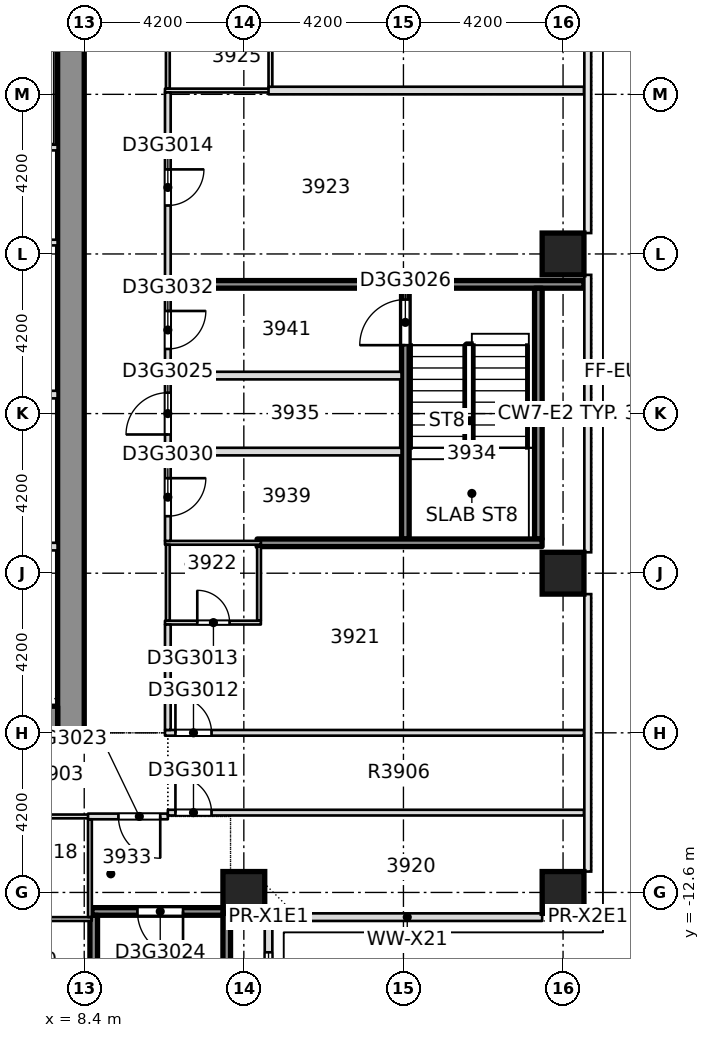
"""IFC4 building model, lengths in metres.
Left out: names, types, materials, properties, quantities, classifications, styles, units other than length and angle.
Written with IfcOpenShell. Run it as: python <this file> out.ifc"""

import sys

from ifc_helpers import new_model, si_unit, direction, frame, frame_2d, origin, origin_2d, place, context, subcontext, project, spatial, rectangle, extrude, element, fill, save


model = new_model("IFC4")
c1 = context("Model", 3, precision=1e-05, world=origin(), true_north=direction((0.0, 1.0)))
c2 = subcontext(c1, "Body", "Model", "MODEL_VIEW")
j1 = project(units=[si_unit("LENGTHUNIT", "METRE"), si_unit("PLANEANGLEUNIT", "RADIAN")], contexts=[c1])
p1 = place(None, origin())
s1 = spatial("IfcSite", under=j1, at=p1, CompositionType="ELEMENT")
p2 = place(p1, origin())
s2 = spatial("IfcBuilding", under=s1, at=p2, CompositionType="ELEMENT")
p3 = place(p2, frame((0.0, 0.0, 153.8)))
s3 = spatial("IfcBuildingStorey", under=s2, at=p3, CompositionType="ELEMENT", Elevation=153.8)
p4 = place(p3, frame((8.05, -8.4, -0.4), z_axis=(0.0, 0.0, 1.0), x_axis=(0.0, 1.0, 0.0)))
e1 = element("IfcWall", 1, at=p4, inside=s3, PredefinedType="SOLIDWALL", context=c2, shape_type="SweptSolid", body=[
    extrude(rectangle(XDim=30.15, YDim=0.7, at=frame_2d((15.075, 0.0))), origin(), (0.0, 0.0, 1.0), 3.45),
])
p5 = place(p4, frame((19.3, 0.0, 0.4)))
e2 = element("IfcOpeningElement", 2, at=p5, cuts=e1, PredefinedType="OPENING", context=c2, shape_type="SweptSolid", body=[
    extrude(rectangle(XDim=1.2, YDim=2.1, at=frame_2d((0.6, 1.05))), frame((0.0, 0.36, 0.0), z_axis=(0.0, -1.0, 0.0), x_axis=(1.0, 0.0, 0.0)), (0.0, 0.0, 1.0), 0.72),
])
p6 = place(p3, frame((-7.7, -8.05, -0.4), z_axis=(0.0, 0.0, 1.0), x_axis=(1.0, 0.0, 0.0)))
e3 = element("IfcWall", 3, at=p6, inside=s3, PredefinedType="SHEAR", context=c2, shape_type="SweptSolid", body=[
    extrude(rectangle(XDim=15.4, YDim=0.7, at=frame_2d((7.7, 0.0))), origin(), (0.0, 0.0, 1.0), 3.45),
])
p7 = place(p6, frame((2.95, 0.0, 0.4)))
e4 = element("IfcOpeningElement", 4, at=p7, cuts=e3, PredefinedType="OPENING", context=c2, shape_type="SweptSolid", body=[
    extrude(rectangle(XDim=1.8, YDim=2.1, at=frame_2d((0.9, 1.05))), frame((0.0, 0.36, 0.0), z_axis=(0.0, -1.0, 0.0), x_axis=(1.0, 0.0, 0.0)), (0.0, 0.0, 1.0), 0.72),
])
p8 = place(p6, frame((10.65, 0.0, 0.4)))
e5 = element("IfcOpeningElement", 5, at=p8, cuts=e3, PredefinedType="OPENING", context=c2, shape_type="SweptSolid", body=[
    extrude(rectangle(XDim=1.8, YDim=2.1, at=frame_2d((0.9, 1.05))), frame((0.0, 0.36, 0.0), z_axis=(0.0, -1.0, 0.0), x_axis=(1.0, 0.0, 0.0)), (0.0, 0.0, 1.0), 0.72),
])
for number, where, z_axis, x_axis in (
    (6, (12.6, -12.6, -0.4), (0.0, 0.0, 1.0), (1.0, 0.0, 0.0)),
    (7, (21.0, -12.6, -0.4), (0.0, 0.0, 1.0), (1.0, 0.0, 0.0)),
    (8, (21.0, -4.2, -0.4), (0.0, 0.0, 1.0), (1.0, 0.0, 0.0)),
    (9, (21.0, 4.2, -0.4), (0.0, 0.0, 1.0), (1.0, 0.0, 0.0)),
):
    element("IfcColumn", number, at=place(p3, frame(where, z_axis=z_axis, x_axis=x_axis)), inside=s3, PredefinedType="COLUMN", context=c2, shape_type="SweptSolid", body=[
        extrude(rectangle(XDim=1.1, YDim=1.1, at=origin_2d()), origin(), (0.0, 0.0, 1.0), 3.45),
    ])
p9 = place(p3, frame((5.802, -13.3, 0.0), z_axis=(0.0, 0.0, 1.0), x_axis=(1.0, 0.0, 0.0)))
e10 = element("IfcWall", 10, at=p9, inside=s3, PredefinedType="PARTITIONING", context=c2, shape_type="SweptSolid", body=[
    extrude(rectangle(XDim=2.796, YDim=0.1, at=frame_2d((1.398, 0.0))), origin(), (0.0, 0.0, 1.0), 3.05),
])
p10 = place(p9, frame((0.248, 0.0, 0.0)))
e11 = element("IfcOpeningElement", 11, at=p10, cuts=e10, PredefinedType="OPENING", context=c2, shape_type="SweptSolid", body=[
    extrude(rectangle(XDim=0.85, YDim=2.1, at=frame_2d((0.425, 1.05))), frame((0.0, 0.06, 0.0), z_axis=(0.0, -1.0, 0.0), x_axis=(1.0, 0.0, 0.0)), (0.0, 0.0, 1.0), 0.12),
])
p11 = place(p3, frame((8.602, -13.1, 0.0), z_axis=(0.0, 0.0, 1.0), x_axis=(1.0, 0.0, 0.0)))
e12 = element("IfcWall", 12, at=p11, inside=s3, PredefinedType="SOLIDWALL", context=c2, shape_type="SweptSolid", body=[
    extrude(rectangle(XDim=3.548, YDim=0.2, at=frame_2d((1.774, 0.0))), origin(), (0.0, 0.0, 1.0), 3.05),
])
p12 = place(p11, frame((1.198, 0.0, 0.0)))
e13 = element("IfcOpeningElement", 13, at=p12, cuts=e12, PredefinedType="OPENING", context=c2, shape_type="SweptSolid", body=[
    extrude(rectangle(XDim=1.2, YDim=2.1, at=frame_2d((0.6, 1.05))), frame((0.0, 0.11, 0.0), z_axis=(0.0, -1.0, 0.0), x_axis=(1.0, 0.0, 0.0)), (0.0, 0.0, 1.0), 0.22),
])
p13 = place(p3, frame((5.8, -10.6, 0.0), z_axis=(0.0, 0.0, 1.0), x_axis=(1.0, 0.0, 0.0)))
e14 = element("IfcWall", 14, at=p13, inside=s3, PredefinedType="PARTITIONING", context=c2, shape_type="SweptSolid", body=[
    extrude(rectangle(XDim=2.8, YDim=0.1, at=frame_2d((1.4, 0.0))), origin(), (0.0, 0.0, 1.0), 3.05),
])
p14 = place(p3, frame((8.5, -10.6, 0.0), z_axis=(0.0, 0.0, 1.0), x_axis=(1.0, 0.0, 0.0)))
e15 = element("IfcWall", 15, at=p14, inside=s3, PredefinedType="PARTITIONING", context=c2, shape_type="SweptSolid", body=[
    extrude(rectangle(XDim=2.1, YDim=0.15, at=frame_2d((1.05, 0.0))), origin(), (0.0, 0.0, 1.0), 3.05),
])
p15 = place(p14, frame((0.8, 0.0, 0.0)))
e16 = element("IfcOpeningElement", 16, at=p15, cuts=e15, PredefinedType="OPENING", context=c2, shape_type="SweptSolid", body=[
    extrude(rectangle(XDim=1.1, YDim=2.1, at=frame_2d((0.55, 1.05))), frame((0.0, 0.085, 0.0), z_axis=(0.0, -1.0, 0.0), x_axis=(1.0, 0.0, 0.0)), (0.0, 0.0, 1.0), 0.17),
])
p16 = place(p3, frame((10.6, -10.5, 0.0), z_axis=(0.0, 0.0, 1.0), x_axis=(1.0, 0.0, 0.0)))
e17 = element("IfcWall", 17, at=p16, inside=s3, PredefinedType="PARTITIONING", context=c2, shape_type="SweptSolid", body=[
    extrude(rectangle(XDim=10.95, YDim=0.15, at=frame_2d((5.475, 0.0))), origin(), (0.0, 0.0, 1.0), 3.05),
])
p17 = place(p16, frame((0.2, 0.0, 0.0)))
e18 = element("IfcOpeningElement", 18, at=p17, cuts=e17, PredefinedType="OPENING", context=c2, shape_type="SweptSolid", body=[
    extrude(rectangle(XDim=0.95, YDim=2.1, at=frame_2d((0.475, 1.05))), frame((0.0, 0.085, 0.0), z_axis=(0.0, -1.0, 0.0), x_axis=(1.0, 0.0, 0.0)), (0.0, 0.0, 1.0), 0.17),
])
p18 = place(p3, frame((10.525, -8.4, 0.0), z_axis=(0.0, 0.0, 1.0), x_axis=(1.0, 0.0, 0.0)))
e19 = element("IfcWall", 19, at=p18, inside=s3, PredefinedType="PARTITIONING", context=c2, shape_type="SweptSolid", body=[
    extrude(rectangle(XDim=11.025, YDim=0.15, at=frame_2d((5.513, 0.0))), origin(), (0.0, 0.0, 1.0), 3.05),
])
p19 = place(p18, frame((0.275, 0.0, 0.0)))
e20 = element("IfcOpeningElement", 20, at=p19, cuts=e19, PredefinedType="OPENING", context=c2, shape_type="SweptSolid", body=[
    extrude(rectangle(XDim=0.95, YDim=2.1, at=frame_2d((0.475, 1.05))), frame((0.0, 0.085, 0.0), z_axis=(0.0, -1.0, 0.0), x_axis=(1.0, 0.0, 0.0)), (0.0, 0.0, 1.0), 0.17),
])
p20 = place(p3, frame((10.525, -5.5, 0.0), z_axis=(0.0, 0.0, 1.0), x_axis=(1.0, 0.0, 0.0)))
e21 = element("IfcWall", 21, at=p20, inside=s3, PredefinedType="PARTITIONING", context=c2, shape_type="SweptSolid", body=[
    extrude(rectangle(XDim=2.523, YDim=0.1, at=frame_2d((1.262, 0.0))), origin(), (0.0, 0.0, 1.0), 3.05),
])
p21 = place(p20, frame((0.85, 0.0, 0.0)))
e22 = element("IfcOpeningElement", 22, at=p21, cuts=e21, PredefinedType="OPENING", context=c2, shape_type="SweptSolid", body=[
    extrude(rectangle(XDim=0.85, YDim=2.1, at=frame_2d((0.425, 1.05))), frame((0.0, 0.06, 0.0), z_axis=(0.0, -1.0, 0.0), x_axis=(1.0, 0.0, 0.0)), (0.0, 0.0, 1.0), 0.12),
])
p22 = place(p3, frame((10.525, -3.4, 0.0), z_axis=(0.0, 0.0, 1.0), x_axis=(1.0, 0.0, 0.0)))
e23 = element("IfcWall", 23, at=p22, inside=s3, PredefinedType="PARTITIONING", context=c2, shape_type="SweptSolid", body=[
    extrude(rectangle(XDim=2.525, YDim=0.1, at=frame_2d((1.263, 0.0))), origin(), (0.0, 0.0, 1.0), 3.05),
])
for number, where, z_axis, x_axis in (
    (24, (10.675, -1.0, 0.0), (0.0, 0.0, 1.0), (1.0, 0.0, 0.0)),
    (25, (10.675, 1.0, 0.0), (0.0, 0.0, 1.0), (1.0, 0.0, 0.0)),
):
    element("IfcWall", number, at=place(p3, frame(where, z_axis=z_axis, x_axis=x_axis)), inside=s3, PredefinedType="PARTITIONING", context=c2, shape_type="SweptSolid", body=[
        extrude(rectangle(XDim=6.075, YDim=0.2, at=frame_2d((3.038, 0.0))), origin(), (0.0, 0.0, 1.0), 3.05),
    ])
p23 = place(p3, frame((10.675, 3.4, 0.0), z_axis=(0.0, 0.0, 1.0), x_axis=(1.0, 0.0, 0.0)))
e26 = element("IfcWall", 26, at=p23, inside=s3, PredefinedType="SOLIDWALL", context=c2, shape_type="SweptSolid", body=[
    extrude(rectangle(XDim=10.875, YDim=0.2, at=frame_2d((5.438, 0.0))), origin(), (0.0, 0.0, 1.0), 3.05),
])
p24 = place(p3, frame((10.525, 8.5, 0.0), z_axis=(0.0, 0.0, 1.0), x_axis=(1.0, 0.0, 0.0)))
e27 = element("IfcWall", 27, at=p24, inside=s3, PredefinedType="PARTITIONING", context=c2, shape_type="SweptSolid", body=[
    extrude(rectangle(XDim=2.825, YDim=0.1, at=frame_2d((1.413, 0.0))), origin(), (0.0, 0.0, 1.0), 3.05),
])
p25 = place(p3, frame((13.25, 8.5, 0.0), z_axis=(0.0, 0.0, 1.0), x_axis=(1.0, 0.0, 0.0)))
e28 = element("IfcWall", 28, at=p25, inside=s3, PredefinedType="PARTITIONING", context=c2, shape_type="SweptSolid", body=[
    extrude(rectangle(XDim=8.3, YDim=0.2, at=frame_2d((4.15, 0.0))), origin(), (0.0, 0.0, 1.0), 3.05),
])
p26 = place(p3, frame((8.55, -13.248, 0.0), z_axis=(0.0, 0.0, 1.0), x_axis=(0.0, 1.0, 0.0)))
e29 = element("IfcWall", 29, at=p26, inside=s3, PredefinedType="PARTITIONING", context=c2, shape_type="SweptSolid", body=[
    extrude(rectangle(XDim=2.573, YDim=0.1, at=frame_2d((1.287, 0.0))), origin(), (0.0, 0.0, 1.0), 3.05),
])
p27 = place(p3, frame((8.65, -19.798, 0.0), z_axis=(0.0, 0.0, 1.0), x_axis=(0.0, 1.0, 0.0)))
e30 = element("IfcWall", 30, at=p27, inside=s3, PredefinedType="SOLIDWALL", context=c2, shape_type="SweptSolid", body=[
    extrude(rectangle(XDim=6.596, YDim=0.2, at=frame_2d((3.298, 0.0))), origin(), (0.0, 0.0, 1.0), 3.05),
])
p28 = place(p3, frame((10.6, -8.325, 0.0), z_axis=(0.0, 0.0, 1.0), x_axis=(0.0, 1.0, 0.0)))
e31 = element("IfcWall", 31, at=p28, inside=s3, PredefinedType="PARTITIONING", context=c2, shape_type="SweptSolid", body=[
    extrude(rectangle(XDim=2.775, YDim=0.15, at=frame_2d((1.387, 0.0))), origin(), (0.0, 0.0, 1.0), 3.05),
])
p29 = place(p3, frame((10.6, -5.45, 0.0), z_axis=(0.0, 0.0, 1.0), x_axis=(0.0, 1.0, 0.0)))
e32 = element("IfcWall", 32, at=p29, inside=s3, PredefinedType="PARTITIONING", context=c2, shape_type="SweptSolid", body=[
    extrude(rectangle(XDim=2.0, YDim=0.1, at=frame_2d((1.0, 0.0))), origin(), (0.0, 0.0, 1.0), 3.05),
])
p30 = place(p3, frame((10.6, -3.35, 0.0), z_axis=(0.0, 0.0, 1.0), x_axis=(0.0, 1.0, 0.0)))
e33 = element("IfcWall", 33, at=p30, inside=s3, PredefinedType="PARTITIONING", context=c2, shape_type="SweptSolid", body=[
    extrude(rectangle(XDim=11.8, YDim=0.15, at=frame_2d((5.9, 0.0))), origin(), (0.0, 0.0, 1.0), 3.05),
])
p31 = place(p30, frame((8.825, 0.0, 0.0)))
e34 = element("IfcOpeningElement", 34, at=p31, cuts=e33, PredefinedType="OPENING", context=c2, shape_type="SweptSolid", body=[
    extrude(rectangle(XDim=0.95, YDim=2.1, at=frame_2d((0.475, 1.05))), frame((0.0, 0.085, 0.0), z_axis=(0.0, -1.0, 0.0), x_axis=(1.0, 0.0, 0.0)), (0.0, 0.0, 1.0), 0.17),
])
p32 = place(p30, frame((2.8, 0.0, 0.0)))
e35 = element("IfcOpeningElement", 35, at=p32, cuts=e33, PredefinedType="OPENING", context=c2, shape_type="SweptSolid", body=[
    extrude(rectangle(XDim=1.1, YDim=2.1, at=frame_2d((0.55, 1.05))), frame((0.0, 0.085, 0.0), z_axis=(0.0, -1.0, 0.0), x_axis=(1.0, 0.0, 0.0)), (0.0, 0.0, 1.0), 0.17),
])
p33 = place(p30, frame((0.65, 0.0, 0.0)))
e36 = element("IfcOpeningElement", 36, at=p33, cuts=e33, PredefinedType="OPENING", context=c2, shape_type="SweptSolid", body=[
    extrude(rectangle(XDim=1.0, YDim=2.1, at=frame_2d((0.5, 1.05))), frame((0.0, 0.085, 0.0), z_axis=(0.0, -1.0, 0.0), x_axis=(1.0, 0.0, 0.0)), (0.0, 0.0, 1.0), 0.17),
])
p34 = place(p30, frame((5.05, 0.0, 0.0)))
e37 = element("IfcOpeningElement", 37, at=p34, cuts=e33, PredefinedType="OPENING", context=c2, shape_type="SweptSolid", body=[
    extrude(rectangle(XDim=1.0, YDim=2.1, at=frame_2d((0.5, 1.05))), frame((0.0, 0.085, 0.0), z_axis=(0.0, -1.0, 0.0), x_axis=(1.0, 0.0, 0.0)), (0.0, 0.0, 1.0), 0.17),
])
p35 = place(p3, frame((10.6, 8.55, 0.0), z_axis=(0.0, 0.0, 1.0), x_axis=(0.0, 1.0, 0.0)))
e38 = element("IfcWall", 38, at=p35, inside=s3, PredefinedType="PARTITIONING", context=c2, shape_type="SweptSolid", body=[
    extrude(rectangle(XDim=2.6, YDim=0.1, at=frame_2d((1.3, 0.0))), origin(), (0.0, 0.0, 1.0), 3.05),
])
p36 = place(p3, frame((13.0, -5.448, 0.0), z_axis=(0.0, 0.0, 1.0), x_axis=(0.0, 1.0, 0.0)))
e39 = element("IfcWall", 39, at=p36, inside=s3, PredefinedType="PARTITIONING", context=c2, shape_type="SweptSolid", body=[
    extrude(rectangle(XDim=1.948, YDim=0.1, at=frame_2d((0.974, 0.0))), origin(), (0.0, 0.0, 1.0), 3.05),
])
p37 = place(p3, frame((13.3, 8.6, 0.0), z_axis=(0.0, 0.0, 1.0), x_axis=(0.0, 1.0, 0.0)))
e40 = element("IfcWall", 40, at=p37, inside=s3, PredefinedType="PARTITIONING", context=c2, shape_type="SweptSolid", body=[
    extrude(rectangle(XDim=2.55, YDim=0.1, at=frame_2d((1.275, 0.0))), origin(), (0.0, 0.0, 1.0), 3.05),
])
p38 = place(p3, frame((16.85, -3.3, 0.0), z_axis=(0.0, 0.0, 1.0), x_axis=(0.0, 1.0, 0.0)))
e41 = element("IfcWall", 41, at=p38, inside=s3, PredefinedType="SOLIDWALL", context=c2, shape_type="SweptSolid", body=[
    extrude(rectangle(XDim=6.6, YDim=0.2, at=frame_2d((3.3, 0.0))), origin(), (0.0, 0.0, 1.0), 3.05),
])
p39 = place(p38, frame((5.1, 0.0, 0.0)))
e42 = element("IfcOpeningElement", 42, at=p39, cuts=e41, PredefinedType="OPENING", context=c2, shape_type="SweptSolid", body=[
    extrude(rectangle(XDim=1.2, YDim=2.1, at=frame_2d((0.6, 1.05))), frame((0.0, 0.11, 0.0), z_axis=(0.0, -1.0, 0.0), x_axis=(1.0, 0.0, 0.0)), (0.0, 0.0, 1.0), 0.22),
])
p40 = place(p3, frame((20.35, -3.298, 0.0), z_axis=(0.0, 0.0, 1.0), x_axis=(0.0, 1.0, 0.0)))
e43 = element("IfcWall", 43, at=p40, inside=s3, PredefinedType="SOLIDWALL", context=c2, shape_type="SweptSolid", body=[
    extrude(rectangle(XDim=6.596, YDim=0.2, at=frame_2d((3.298, 0.0))), origin(), (0.0, 0.0, 1.0), 3.05),
])
p41 = place(p3, frame((13.25, -20.45, 0.0), z_axis=(0.0, 0.0, 1.0), x_axis=(0.0, 1.0, 0.0)))
e44 = element("IfcWall", 44, at=p41, inside=s3, PredefinedType="STANDARD", context=c2, shape_type="SweptSolid", body=[
    extrude(rectangle(XDim=7.1, YDim=0.2, at=frame_2d((3.55, 0.0))), origin(), (0.0, 0.0, 1.0), 3.05),
])
p42 = place(p41, frame((0.925, 0.0, 0.2)))
e45 = element("IfcOpeningElement", 45, at=p42, cuts=e44, PredefinedType="OPENING", context=c2, shape_type="SweptSolid", body=[
    extrude(rectangle(XDim=1.8, YDim=2.65, at=frame_2d((0.9, 1.325))), frame((0.0, 0.11, 0.0), z_axis=(0.0, -1.0, 0.0), x_axis=(1.0, 0.0, 0.0)), (0.0, 0.0, 1.0), 0.22),
])
p43 = place(p41, frame((4.475, 0.0, 0.2)))
e46 = element("IfcOpeningElement", 46, at=p43, cuts=e44, PredefinedType="OPENING", context=c2, shape_type="SweptSolid", body=[
    extrude(rectangle(XDim=1.8, YDim=2.65, at=frame_2d((0.9, 1.325))), frame((0.0, 0.11, 0.0), z_axis=(0.0, -1.0, 0.0), x_axis=(1.0, 0.0, 0.0)), (0.0, 0.0, 1.0), 0.22),
])
p44 = place(p3, frame((13.35, -13.25, 0.0), z_axis=(0.0, 0.0, 1.0), x_axis=(1.0, 0.0, 0.0)))
e47 = element("IfcWall", 47, at=p44, inside=s3, PredefinedType="STANDARD", context=c2, shape_type="SweptSolid", body=[
    extrude(rectangle(XDim=7.1, YDim=0.2, at=frame_2d((3.55, 0.0))), origin(), (0.0, 0.0, 1.0), 3.05),
])
for number, where, z_axis, x_axis in (
    (48, (5.575, -3.5, 0.0), (0.0, 0.0, 1.0), (1.0, 0.0, 0.0)),
    (49, (5.575, 0.5, 0.0), (0.0, 0.0, 1.0), (1.0, 0.0, 0.0)),
):
    element("IfcWall", number, at=place(p3, frame(where, z_axis=z_axis, x_axis=x_axis)), inside=s3, PredefinedType="PARTITIONING", context=c2, shape_type="SweptSolid", body=[
        extrude(rectangle(XDim=2.124, YDim=0.2, at=frame_2d((1.062, 0.0))), origin(), (0.0, 0.0, 1.0), 3.05),
    ])
p45 = place(p3, frame((5.425, 4.5, 0.0), z_axis=(0.0, 0.0, 1.0), x_axis=(1.0, 0.0, 0.0)))
e50 = element("IfcWall", 50, at=p45, inside=s3, PredefinedType="PARTITIONING", context=c2, shape_type="SweptSolid", body=[
    extrude(rectangle(XDim=2.274, YDim=0.15, at=frame_2d((1.137, 0.0))), origin(), (0.0, 0.0, 1.0), 3.05),
])
p46 = place(p3, frame((-7.699, 7.0, 0.0), z_axis=(0.0, 0.0, 1.0), x_axis=(1.0, 0.0, 0.0)))
e51 = element("IfcWall", 51, at=p46, inside=s3, PredefinedType="PARTITIONING", context=c2, shape_type="SweptSolid", body=[
    extrude(rectangle(XDim=15.398, YDim=0.15, at=frame_2d((7.699, 0.0))), origin(), (0.0, 0.0, 1.0), 3.05),
])
p47 = place(p46, frame((6.999, 0.0, 0.0)))
e52 = element("IfcOpeningElement", 52, at=p47, cuts=e51, PredefinedType="OPENING", context=c2, shape_type="SweptSolid", body=[
    extrude(rectangle(XDim=1.4, YDim=2.1, at=frame_2d((0.7, 1.05))), frame((0.0, 0.085, 0.0), z_axis=(0.0, -1.0, 0.0), x_axis=(1.0, 0.0, 0.0)), (0.0, 0.0, 1.0), 0.17),
])
p48 = place(p3, frame((12.95, -3.4, 0.0), z_axis=(0.0, 0.0, 1.0), x_axis=(1.0, 0.0, 0.0)))
e53 = element("IfcWall", 53, at=p48, inside=s3, PredefinedType="SOLIDWALL", context=c2, shape_type="SweptSolid", body=[
    extrude(rectangle(XDim=7.498, YDim=0.2, at=frame_2d((3.749, 0.0))), origin(), (0.0, 0.0, 1.0), 3.05),
])
p49 = place(p3, frame((12.15, -20.45, 0.0), z_axis=(0.0, 0.0, 1.0), x_axis=(0.0, 1.0, 0.0)))
e54 = element("IfcWall", 54, at=p49, inside=s3, PredefinedType="SOLIDWALL", context=c2, shape_type="SweptSolid", body=[
    extrude(rectangle(XDim=7.3, YDim=0.2, at=frame_2d((3.65, 0.0))), origin(), (0.0, 0.0, 1.0), 3.05),
])
p50 = place(p17, origin())
e55 = element("IfcDoor", 55, at=p50, inside=s3, OperationType="SINGLE_SWING_RIGHT", PredefinedType="DOOR", context=c2, shape_type="SweptSolid", body=[
    extrude(rectangle(XDim=0.95, YDim=2.1, at=frame_2d((0.475, 1.05))), frame((0.0, 0.025, 0.0), z_axis=(0.0, -1.0, 0.0), x_axis=(1.0, 0.0, 0.0)), (0.0, 0.0, 1.0), 0.05),
])
fill(e18, e55)
p51 = place(p19, origin())
e56 = element("IfcDoor", 56, at=p51, inside=s3, OperationType="SINGLE_SWING_LEFT", PredefinedType="DOOR", context=c2, shape_type="SweptSolid", body=[
    extrude(rectangle(XDim=0.95, YDim=2.1, at=frame_2d((0.475, 1.05))), frame((0.0, 0.025, 0.0), z_axis=(0.0, -1.0, 0.0), x_axis=(1.0, 0.0, 0.0)), (0.0, 0.0, 1.0), 0.05),
])
fill(e20, e56)
p52 = place(p21, origin())
e57 = element("IfcDoor", 57, at=p52, inside=s3, OperationType="SINGLE_SWING_LEFT", PredefinedType="DOOR", context=c2, shape_type="SweptSolid", body=[
    extrude(rectangle(XDim=0.85, YDim=2.1, at=frame_2d((0.425, 1.05))), frame((0.0, 0.025, 0.0), z_axis=(0.0, -1.0, 0.0), x_axis=(1.0, 0.0, 0.0)), (0.0, 0.0, 1.0), 0.05),
])
fill(e22, e57)
p53 = place(p31, origin())
e58 = element("IfcDoor", 58, at=p53, inside=s3, OperationType="SINGLE_SWING_LEFT", PredefinedType="DOOR", context=c2, shape_type="SweptSolid", body=[
    extrude(rectangle(XDim=0.95, YDim=2.1, at=frame_2d((0.475, 1.05))), frame((0.0, 0.025, 0.0), z_axis=(0.0, -1.0, 0.0), x_axis=(1.0, 0.0, 0.0)), (0.0, 0.0, 1.0), 0.05),
])
fill(e34, e58)
p54 = place(p15, origin())
e59 = element("IfcDoor", 59, at=p54, inside=s3, OperationType="SINGLE_SWING_RIGHT", PredefinedType="DOOR", context=c2, shape_type="SweptSolid", body=[
    extrude(rectangle(XDim=1.1, YDim=2.1, at=frame_2d((0.55, 1.05))), frame((0.0, 0.025, 0.0), z_axis=(0.0, -1.0, 0.0), x_axis=(1.0, 0.0, 0.0)), (0.0, 0.0, 1.0), 0.05),
])
fill(e16, e59)
p55 = place(p12, origin())
e60 = element("IfcDoor", 60, at=p55, inside=s3, OperationType="SINGLE_SWING_RIGHT", PredefinedType="DOOR", context=c2, shape_type="SweptSolid", body=[
    extrude(rectangle(XDim=1.2, YDim=2.1, at=frame_2d((0.6, 1.05))), frame((0.0, 0.025, 0.0), z_axis=(0.0, -1.0, 0.0), x_axis=(1.0, 0.0, 0.0)), (0.0, 0.0, 1.0), 0.05),
])
fill(e13, e60)
p56 = place(p32, origin())
e61 = element("IfcDoor", 61, at=p56, inside=s3, OperationType="SINGLE_SWING_LEFT", PredefinedType="DOOR", context=c2, shape_type="SweptSolid", body=[
    extrude(rectangle(XDim=1.1, YDim=2.1, at=frame_2d((0.55, 1.05))), frame((0.0, 0.025, 0.0), z_axis=(0.0, -1.0, 0.0), x_axis=(1.0, 0.0, 0.0)), (0.0, 0.0, 1.0), 0.05),
])
fill(e35, e61)
p57 = place(p39, origin())
e62 = element("IfcDoor", 62, at=p57, inside=s3, OperationType="SINGLE_SWING_LEFT", PredefinedType="DOOR", context=c2, shape_type="SweptSolid", body=[
    extrude(rectangle(XDim=1.2, YDim=2.1, at=frame_2d((0.6, 1.05))), frame((0.0, 0.025, 0.0), z_axis=(0.0, -1.0, 0.0), x_axis=(1.0, 0.0, 0.0)), (0.0, 0.0, 1.0), 0.05),
])
fill(e42, e62)
p58 = place(p33, origin())
e63 = element("IfcDoor", 63, at=p58, inside=s3, OperationType="SINGLE_SWING_RIGHT", PredefinedType="DOOR", context=c2, shape_type="SweptSolid", body=[
    extrude(rectangle(XDim=1.0, YDim=2.1, at=frame_2d((0.5, 1.05))), frame((0.0, 0.025, 0.0), z_axis=(0.0, -1.0, 0.0), x_axis=(1.0, 0.0, 0.0)), (0.0, 0.0, 1.0), 0.05),
])
fill(e36, e63)
p59 = place(p34, origin())
e64 = element("IfcDoor", 64, at=p59, inside=s3, OperationType="SINGLE_SWING_LEFT", PredefinedType="DOOR", context=c2, shape_type="SweptSolid", body=[
    extrude(rectangle(XDim=1.0, YDim=2.1, at=frame_2d((0.5, 1.05))), frame((0.0, 0.025, 0.0), z_axis=(0.0, -1.0, 0.0), x_axis=(1.0, 0.0, 0.0)), (0.0, 0.0, 1.0), 0.05),
])
fill(e37, e64)
p60 = place(p43, origin())
e65 = element("IfcWindow", 65, at=p60, inside=s3, PartitioningType="SINGLE_PANEL", PredefinedType="WINDOW", context=c2, shape_type="SweptSolid", body=[
    extrude(rectangle(XDim=1.8, YDim=2.65, at=frame_2d((0.9, 1.325))), frame((0.0, 0.03, 0.0), z_axis=(0.0, -1.0, 0.0), x_axis=(1.0, 0.0, 0.0)), (0.0, 0.0, 1.0), 0.06),
])
fill(e46, e65)
save(model, sys.argv[1])
